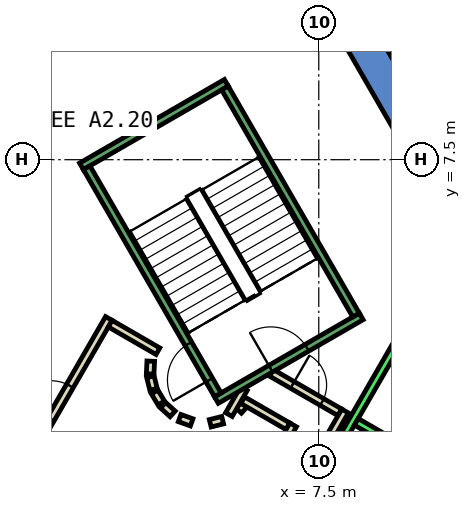
"""IFC4 building model, lengths in metres.
Left out: names, types, materials, properties, quantities, classifications, styles, units other than length and angle.
Written with IfcOpenShell. Run it as: python <this file> out.ifc"""

import sys

from ifc_helpers import new_model, si_unit, direction, frame, frame_2d, origin, place, context, subcontext, project, spatial, polyline, rectangle, outline, extrude, element, fill, save


model = new_model("IFC4")
c1 = context("Model", 3, precision=1e-05, world=origin(), true_north=direction((0.0, 1.0)))
c2 = subcontext(c1, "Body", "Model", "MODEL_VIEW")
j1 = project(units=[si_unit("LENGTHUNIT", "METRE"), si_unit("PLANEANGLEUNIT", "RADIAN")], contexts=[c1])
p1 = place(None, origin())
s1 = spatial("IfcSite", under=j1, at=p1, CompositionType="ELEMENT")
p2 = place(p1, origin())
s2 = spatial("IfcBuilding", under=s1, at=p2, CompositionType="ELEMENT")
p3 = place(p2, frame((0.0, 0.0, 95.0)))
s3 = spatial("IfcBuildingStorey", under=s2, at=p3, CompositionType="ELEMENT", Elevation=95.0)
p4 = place(p3, frame((0.0, 0.0, -0.4)))
e1 = element("IfcWall", 1, at=p4, inside=s3, PredefinedType="SHEAR", context=c2, shape_type="SweptSolid", body=[
    extrude(outline(polyline([(8.517, 11.748), (7.738, 11.298), (12.817, 2.5), (13.856, 2.5), (8.517, 11.748)])), origin(), (0.0, 0.0, 1.0), 4.2),
])
p5 = place(p3, frame((5.39, 0.898, 0.0), z_axis=(0.0, 0.0, 1.0), x_axis=(0.673828488714, 0.738887791073, 0.0)))
e2 = element("IfcWall", 2, at=p5, inside=s3, PredefinedType="PARTITIONING", context=c2, shape_type="SweptSolid", body=[
    extrude(rectangle(XDim=0.263, YDim=0.2, at=frame_2d((0.131, 0.0))), origin(), (0.0, 0.0, 1.0), 3.8),
])
p6 = place(p3, frame((5.499, 1.172, 0.0), z_axis=(0.0, 0.0, 1.0), x_axis=(0.866333505267, -0.499465972466, 0.0)))
e3 = element("IfcWall", 3, at=p6, inside=s3, PredefinedType="PARTITIONING", context=c2, shape_type="SweptSolid", body=[
    extrude(rectangle(XDim=1.374, YDim=0.2, at=frame_2d((0.687, 0.0))), origin(), (0.0, 0.0, 1.0), 3.8),
])
p7 = place(p3, frame((6.826, 0.522, 0.0), z_axis=(0.0, 0.0, 1.0), x_axis=(-0.500016722714, -0.866015748706, 0.0)))
e4 = element("IfcWall", 4, at=p7, inside=s3, PredefinedType="PARTITIONING", context=c2, shape_type="SweptSolid", body=[
    extrude(rectangle(XDim=1.7, YDim=0.2, at=frame_2d((0.85, 0.0))), origin(), (0.0, 0.0, 1.0), 3.8),
])
p8 = place(p3, frame((6.25, 1.894, 0.0), z_axis=(0.0, 0.0, 1.0), x_axis=(0.866043184279, -0.499969202016, 0.0)))
e5 = element("IfcWall", 5, at=p8, inside=s3, PredefinedType="PARTITIONING", context=c2, shape_type="SweptSolid", body=[
    extrude(rectangle(XDim=2.084, YDim=0.2, at=frame_2d((1.042, 0.0))), origin(), (0.0, 0.0, 1.0), 3.8),
])
p9 = place(p8, frame((0.642, 0.0, 0.0)))
e6 = element("IfcOpeningElement", 6, at=p9, cuts=e5, PredefinedType="OPENING", context=c2, shape_type="SweptSolid", body=[
    extrude(rectangle(XDim=0.9, YDim=2.1, at=frame_2d((0.45, 1.05))), frame((0.0, 0.11, 0.0), z_axis=(0.0, -1.0, 0.0), x_axis=(1.0, 0.0, 0.0)), (0.0, 0.0, 1.0), 0.22),
])
p10 = place(p3, frame((8.192, 0.888, 0.0), z_axis=(0.0, 0.0, 1.0), x_axis=(-0.499940625693, -0.866059680843, 0.0)))
e7 = element("IfcWall", 7, at=p10, inside=s3, PredefinedType="PARTITIONING", context=c2, shape_type="SweptSolid", body=[
    extrude(rectangle(XDim=2.68, YDim=0.2, at=frame_2d((1.34, 0.0))), origin(), (0.0, 0.0, 1.0), 3.8),
])
p11 = place(p3, frame((5.135, 0.793, 0.0), z_axis=(0.0, 0.0, 1.0), x_axis=(0.499526442893, 0.866298639529, 0.0)))
e8 = element("IfcWall", 8, at=p11, inside=s3, PredefinedType="PARTITIONING", context=c2, shape_type="SweptSolid", body=[
    extrude(rectangle(XDim=0.791, YDim=0.2, at=frame_2d((0.396, 0.0))), origin(), (0.0, 0.0, 1.0), 3.8),
])
p12 = place(p3, frame((-0.52, -1.0, 0.0), z_axis=(0.0, 0.0, 1.0), x_axis=(0.50011622646, 0.865958290007, 0.0)))
e9 = element("IfcWall", 9, at=p12, inside=s3, PredefinedType="PARTITIONING", context=c2, shape_type="SweptSolid", body=[
    extrude(rectangle(XDim=4.991, YDim=0.2, at=frame_2d((2.496, 0.0))), origin(), (0.0, 0.0, 1.0), 3.8),
])
p13 = place(p12, frame((1.945, 0.0, 0.0)))
e10 = element("IfcOpeningElement", 10, at=p13, cuts=e9, PredefinedType="OPENING", context=c2, shape_type="SweptSolid", body=[
    extrude(rectangle(XDim=1.0, YDim=2.1, at=frame_2d((0.5, 1.05))), frame((0.0, 0.11, 0.0), z_axis=(0.0, -1.0, 0.0), x_axis=(1.0, 0.0, 0.0)), (0.0, 0.0, 1.0), 0.22),
])
p14 = place(p3, frame((2.012, 3.186, 0.0), z_axis=(0.0, 0.0, 1.0), x_axis=(0.865891012941, -0.500232699559, 0.0)))
e11 = element("IfcWall", 11, at=p14, inside=s3, PredefinedType="PARTITIONING", context=c2, shape_type="SweptSolid", body=[
    extrude(rectangle(XDim=1.449, YDim=0.2, at=frame_2d((0.725, 0.0))), origin(), (0.0, 0.0, 1.0), 3.8),
])
p15 = place(p3, frame((3.079, 2.199, 0.0), z_axis=(0.0, 0.0, 1.0), x_axis=(-0.047771483479, -0.998858290933, 0.0)))
e12 = element("IfcWall", 12, at=p15, inside=s3, PredefinedType="PARTITIONING", context=c2, shape_type="SweptSolid", body=[
    extrude(rectangle(XDim=0.337, YDim=0.2, at=frame_2d((0.169, 0.0))), origin(), (0.0, 0.0, 1.0), 3.8),
])
p16 = place(p3, frame((3.07, 1.786, 0.0), z_axis=(0.0, 0.0, 1.0), x_axis=(0.242705583207, -0.970099994784, 0.0)))
e13 = element("IfcWall", 13, at=p16, inside=s3, PredefinedType="PARTITIONING", context=c2, shape_type="SweptSolid", body=[
    extrude(rectangle(XDim=0.338, YDim=0.2, at=frame_2d((0.169, 0.0))), origin(), (0.0, 0.0, 1.0), 3.8),
])
for number, where, z_axis, x_axis in (
    (14, (3.182, 1.388, 0.0), (0.0, 0.0, 1.0), (0.512, -0.859, 0.0)),
    (15, (3.404, 1.039, 0.0), (0.0, 0.0, 1.0), (0.74, -0.672, 0.0)),
):
    element("IfcWall", number, at=place(p3, frame(where, z_axis=z_axis, x_axis=x_axis)), inside=s3, PredefinedType="PARTITIONING", context=c2, shape_type="SweptSolid", body=[
        extrude(rectangle(XDim=0.338, YDim=0.2, at=frame_2d((0.169, 0.0))), origin(), (0.0, 0.0, 1.0), 3.8),
    ])
p17 = place(p3, frame((3.838, 0.702, 0.0), z_axis=(0.0, 0.0, 1.0), x_axis=(0.941035081519, -0.338308993895, 0.0)))
e16 = element("IfcWall", 16, at=p17, inside=s3, PredefinedType="PARTITIONING", context=c2, shape_type="SweptSolid", body=[
    extrude(rectangle(XDim=0.337, YDim=0.2, at=frame_2d((0.168, 0.0))), origin(), (0.0, 0.0, 1.0), 3.8),
])
p18 = place(p3, frame((4.644, 0.564, 0.0), z_axis=(0.0, 0.0, 1.0), x_axis=(0.969929076366, 0.243387729394, 0.0)))
e17 = element("IfcWall", 17, at=p18, inside=s3, PredefinedType="PARTITIONING", context=c2, shape_type="SweptSolid", body=[
    extrude(rectangle(XDim=0.337, YDim=0.2, at=frame_2d((0.168, 0.0))), origin(), (0.0, 0.0, 1.0), 3.8),
])
p19 = place(p3, frame((4.451, -6.19, 0.0), z_axis=(0.0, 0.0, 1.0), x_axis=(0.50000090737, 0.866024879913, 0.0)))
e18 = element("IfcWall", 18, at=p19, inside=s3, PredefinedType="STANDARD", context=c2, shape_type="SweptSolid", body=[
    extrude(rectangle(XDim=10.6, YDim=0.2, at=frame_2d((5.3, 0.0))), origin(), (0.0, 0.0, 1.0), 3.8),
])
p20 = place(p3, frame((8.488, 0.602, 0.0), z_axis=(0.0, 0.0, 1.0), x_axis=(0.866022959057, -0.500004234368, 0.0)))
e19 = element("IfcWall", 19, at=p20, inside=s3, PredefinedType="STANDARD", context=c2, shape_type="SweptSolid", body=[
    extrude(rectangle(XDim=2.5, YDim=0.2, at=frame_2d((1.25, 0.0))), origin(), (0.0, 0.0, 1.0), 3.8),
])
p21 = place(p3, frame((4.806, 1.176, 0.0), z_axis=(0.0, 0.0, 1.0), x_axis=(0.866059941101, 0.499940174841, 0.0)))
e20 = element("IfcWall", 20, at=p21, inside=s3, PredefinedType="STANDARD", context=c2, shape_type="SweptSolid", body=[
    extrude(rectangle(XDim=4.4, YDim=0.2, at=frame_2d((2.2, 0.0))), origin(), (0.0, 0.0, 1.0), 3.8),
])
p22 = place(p21, frame((1.65, 0.0, 0.0)))
e21 = element("IfcOpeningElement", 21, at=p22, cuts=e20, PredefinedType="OPENING", context=c2, shape_type="SweptSolid", body=[
    extrude(rectangle(XDim=1.1, YDim=2.2, at=frame_2d((0.55, 1.1))), frame((0.0, 0.11, 0.0), z_axis=(0.0, -1.0, 0.0), x_axis=(1.0, 0.0, 0.0)), (0.0, 0.0, 1.0), 0.22),
])
p23 = place(p3, frame((1.256, 7.324, 0.0), z_axis=(0.0, 0.0, 1.0), x_axis=(0.866046073146, 0.499964197906, 0.0)))
e22 = element("IfcWall", 22, at=p23, inside=s3, PredefinedType="STANDARD", context=c2, shape_type="SweptSolid", body=[
    extrude(rectangle(XDim=4.4, YDim=0.2, at=frame_2d((2.2, 0.0))), origin(), (0.0, 0.0, 1.0), 3.8),
])
p24 = place(p3, frame((4.843, 1.312, 0.0), z_axis=(0.0, 0.0, 1.0), x_axis=(-0.499963383562, 0.866046543262, 0.0)))
e23 = element("IfcWall", 23, at=p24, inside=s3, PredefinedType="STANDARD", context=c2, shape_type="SweptSolid", body=[
    extrude(rectangle(XDim=6.9, YDim=0.2, at=frame_2d((3.45, 0.0))), origin(), (0.0, 0.0, 1.0), 3.8),
])
p25 = place(p24, frame((0.45, 0.0, 0.0)))
e24 = element("IfcOpeningElement", 24, at=p25, cuts=e23, PredefinedType="OPENING", context=c2, shape_type="SweptSolid", body=[
    extrude(rectangle(XDim=1.1, YDim=2.2, at=frame_2d((0.55, 1.1))), frame((0.0, 0.11, 0.0), z_axis=(0.0, -1.0, 0.0), x_axis=(1.0, 0.0, 0.0)), (0.0, 0.0, 1.0), 0.22),
])
p26 = place(p3, frame((8.48, 3.412, 0.0), z_axis=(0.0, 0.0, 1.0), x_axis=(-0.499978703459, 0.866037698999, 0.0)))
e25 = element("IfcWall", 25, at=p26, inside=s3, PredefinedType="STANDARD", context=c2, shape_type="SweptSolid", body=[
    extrude(rectangle(XDim=6.9, YDim=0.2, at=frame_2d((3.45, 0.0))), origin(), (0.0, 0.0, 1.0), 3.8),
])
p27 = place(p13, origin())
e26 = element("IfcDoor", 26, at=p27, inside=s3, OperationType="SINGLE_SWING_LEFT", PredefinedType="DOOR", context=c2, shape_type="SweptSolid", body=[
    extrude(rectangle(XDim=1.0, YDim=2.1, at=frame_2d((0.5, 1.05))), frame((0.0, 0.025, 0.0), z_axis=(0.0, -1.0, 0.0), x_axis=(1.0, 0.0, 0.0)), (0.0, 0.0, 1.0), 0.05),
])
fill(e10, e26)
p28 = place(p9, origin())
e27 = element("IfcDoor", 27, at=p28, inside=s3, OperationType="SINGLE_SWING_LEFT", PredefinedType="DOOR", context=c2, shape_type="SweptSolid", body=[
    extrude(rectangle(XDim=0.9, YDim=2.1, at=frame_2d((0.45, 1.05))), frame((0.0, 0.025, 0.0), z_axis=(0.0, -1.0, 0.0), x_axis=(1.0, 0.0, 0.0)), (0.0, 0.0, 1.0), 0.05),
])
fill(e6, e27)
p29 = place(p25, origin())
e28 = element("IfcDoor", 28, at=p29, inside=s3, OperationType="SINGLE_SWING_LEFT", PredefinedType="DOOR", context=c2, shape_type="SweptSolid", body=[
    extrude(rectangle(XDim=1.1, YDim=2.2, at=frame_2d((0.55, 1.1))), frame((0.0, 0.025, 0.0), z_axis=(0.0, -1.0, 0.0), x_axis=(1.0, 0.0, 0.0)), (0.0, 0.0, 1.0), 0.05),
])
fill(e24, e28)
p30 = place(p22, origin())
e29 = element("IfcDoor", 29, at=p30, inside=s3, OperationType="SINGLE_SWING_LEFT", PredefinedType="DOOR", context=c2, shape_type="SweptSolid", body=[
    extrude(rectangle(XDim=1.1, YDim=2.2, at=frame_2d((0.55, 1.1))), frame((0.0, 0.025, 0.0), z_axis=(0.0, -1.0, 0.0), x_axis=(1.0, 0.0, 0.0)), (0.0, 0.0, 1.0), 0.05),
])
fill(e21, e29)
save(model, sys.argv[1])
